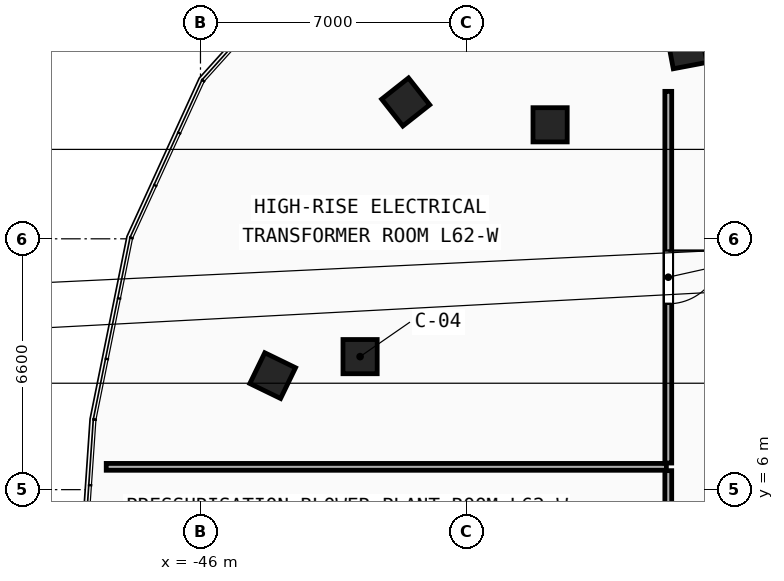
"""IFC4 building model, lengths in metres.
Left out: names, types, materials, properties, quantities, classifications, styles, units other than length and angle.
Written with IfcOpenShell. Run it as: python <this file> out.ifc"""

import sys

from ifc_helpers import new_model, si_unit, direction, frame, frame_2d, origin, origin_2d, place, context, subcontext, project, spatial, rectangle, extrude, element, fill, save


model = new_model("IFC4")
c1 = context("Model", 3, precision=1e-05, world=origin(), true_north=direction((0.0, 1.0)))
c2 = subcontext(c1, "Body", "Model", "MODEL_VIEW")
j1 = project(units=[si_unit("LENGTHUNIT", "METRE"), si_unit("PLANEANGLEUNIT", "RADIAN")], contexts=[c1])
p1 = place(None, origin())
s1 = spatial("IfcSite", under=j1, at=p1, CompositionType="ELEMENT")
p2 = place(p1, origin())
s2 = spatial("IfcBuilding", under=s1, at=p2, CompositionType="ELEMENT")
p3 = place(p2, frame((0.0, 0.0, 235.0)))
s3 = spatial("IfcBuildingStorey", under=s2, at=p3, CompositionType="ELEMENT", Elevation=235.0)
for number, where, z_axis, x_axis in (
    (1, (-41.8, 9.5, 0.0), (0.0, 0.0, 1.0), (1.0, 0.0, 0.0)),
    (2, (-36.8, 15.6, 0.0), (0.0, 0.0, 1.0), (1.0, 0.0, 0.0)),
    (3, (-33.2, 17.6, 0.0), (0.0, 0.0, 1.0), (-0.983, -0.186, 0.0)),
    (4, (-40.6, 16.2, 0.0), (0.0, 0.0, 1.0), (-0.785, -0.619, 0.0)),
    (5, (-44.1, 9.0, 0.0), (0.0, 0.0, 1.0), (-0.437, -0.899, 0.0)),
):
    element("IfcColumn", number, at=place(p3, frame(where, z_axis=z_axis, x_axis=x_axis)), inside=s3, PredefinedType="COLUMN", context=c2, shape_type="SweptSolid", body=[
        extrude(rectangle(XDim=0.9, YDim=0.9, at=origin_2d()), origin(), (0.0, 0.0, 1.0), 4.6),
    ])
p4 = place(p3, frame((-48.48, 6.6, 0.0), z_axis=(0.0, 0.0, 1.0), x_axis=(1.0, 0.0, 0.0)))
e6 = element("IfcWall", 6, at=p4, inside=s3, PredefinedType="PARTITIONING", context=c2, shape_type="SweptSolid", body=[
    extrude(rectangle(XDim=14.74, YDim=0.18, at=frame_2d((7.37, 0.0))), origin(), (0.0, 0.0, 1.0), 4.34),
])
p5 = place(p3, frame((-33.69, 6.5, 0.0), z_axis=(0.0, 0.0, 1.0), x_axis=(0.0, -1.0, 0.0)))
e7 = element("IfcWall", 7, at=p5, inside=s3, PredefinedType="PARTITIONING", context=c2, shape_type="SweptSolid", body=[
    extrude(rectangle(XDim=4.32, YDim=0.18, at=frame_2d((2.16, 0.0))), origin(), (0.0, 0.0, 1.0), 4.34),
])
p6 = place(p3, frame((-33.69, 16.48, 0.0), z_axis=(0.0, 0.0, 1.0), x_axis=(0.0, -1.0, 0.0)))
e8 = element("IfcWall", 8, at=p6, inside=s3, PredefinedType="PARTITIONING", context=c2, shape_type="SweptSolid", body=[
    extrude(rectangle(XDim=9.78, YDim=0.18, at=frame_2d((4.89, 0.0))), origin(), (0.0, 0.0, 1.0), 4.34),
])
p7 = place(p6, frame((4.19, 0.0, 0.0)))
e9 = element("IfcOpeningElement", 9, at=p7, cuts=e8, PredefinedType="OPENING", context=c2, shape_type="SweptSolid", body=[
    extrude(rectangle(XDim=1.4, YDim=2.2, at=frame_2d((0.7, 1.1))), frame((0.0, 0.1, 0.0), z_axis=(0.0, -1.0, 0.0), x_axis=(1.0, 0.0, 0.0)), (0.0, 0.0, 1.0), 0.2),
])
p8 = place(p7, origin())
e10 = element("IfcDoor", 10, at=p8, inside=s3, OperationType="SINGLE_SWING_LEFT", PredefinedType="DOOR", context=c2, shape_type="SweptSolid", body=[
    extrude(rectangle(XDim=1.4, YDim=2.2, at=frame_2d((0.7, 1.1))), frame((0.0, 0.025, 0.0), z_axis=(0.0, -1.0, 0.0), x_axis=(1.0, 0.0, 0.0)), (0.0, 0.0, 1.0), 0.05),
])
fill(e9, e10)
save(model, sys.argv[1])
